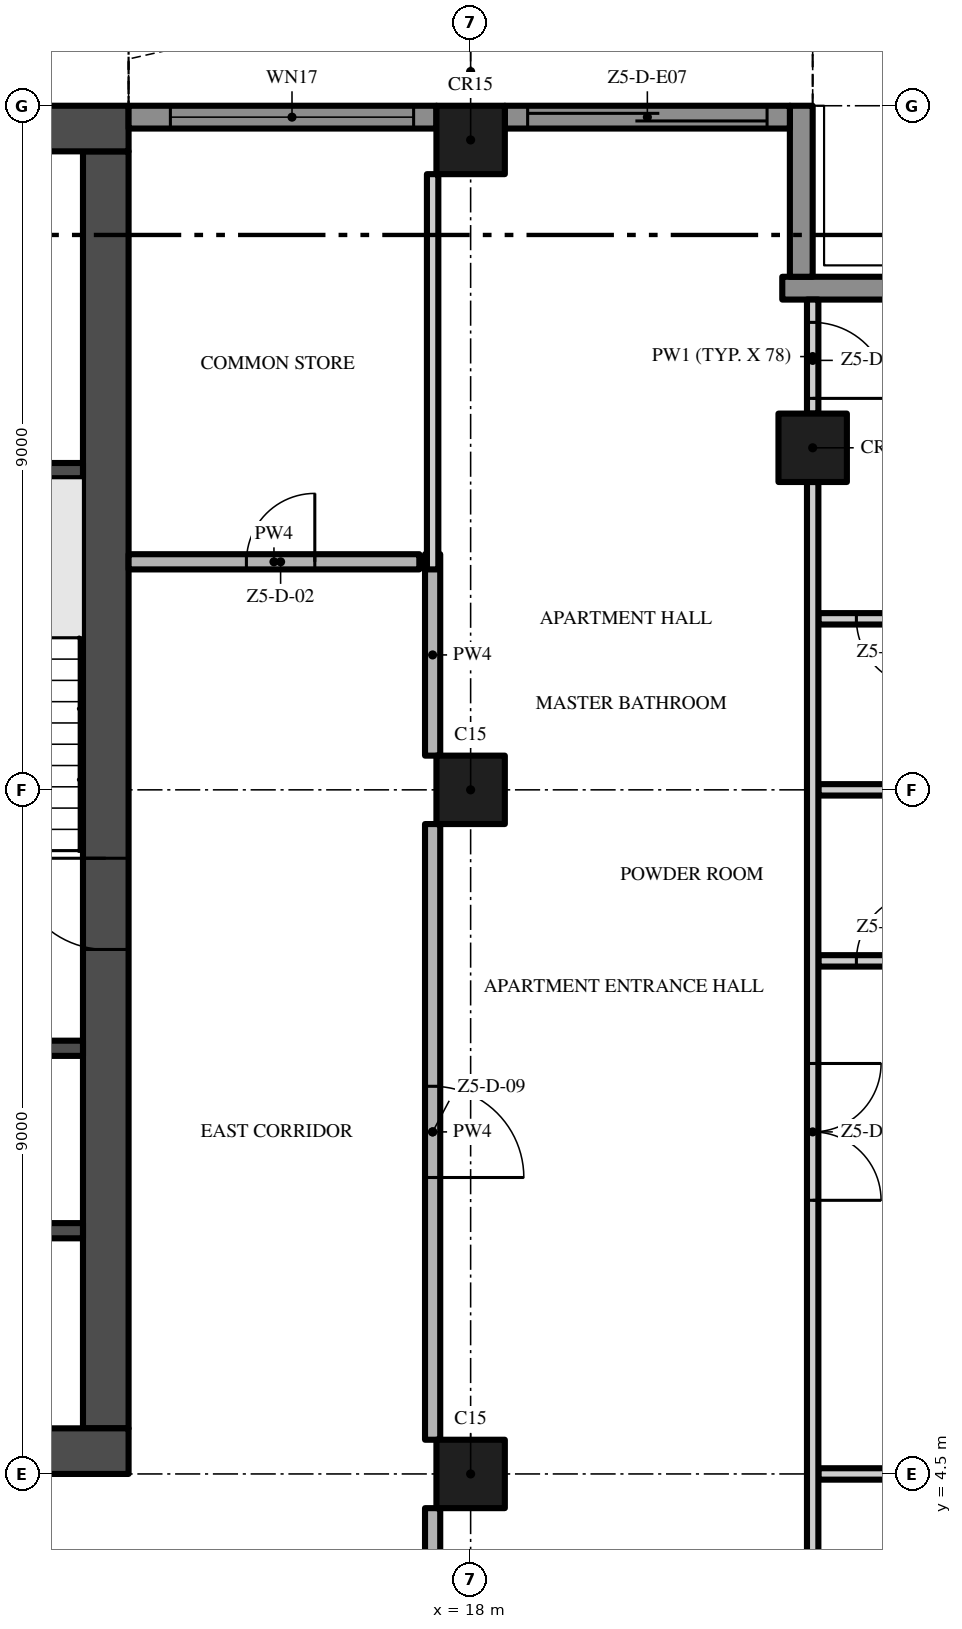
"""IFC4 building model, lengths in metres.
Left out: names, types, materials, properties, quantities, classifications, styles, units other than length and angle.
Written with IfcOpenShell. Run it as: python <this file> out.ifc"""

import sys

from ifc_helpers import new_model, si_unit, direction, frame, frame_2d, origin, origin_2d, place, context, subcontext, project, spatial, polyline, rectangle, outline, extrude, element, fill, save


model = new_model("IFC4")
c1 = context("Model", 3, precision=1e-05, world=origin(), true_north=direction((0.0, 1.0)))
c2 = subcontext(c1, "Body", "Model", "MODEL_VIEW")
j1 = project(units=[si_unit("LENGTHUNIT", "METRE"), si_unit("PLANEANGLEUNIT", "RADIAN")], contexts=[c1])
p1 = place(None, origin())
s1 = spatial("IfcSite", under=j1, at=p1, CompositionType="ELEMENT")
p2 = place(p1, origin())
s2 = spatial("IfcBuilding", under=s1, at=p2, CompositionType="ELEMENT")
p3 = place(p2, frame((0.0, 0.0, 276.8)))
s3 = spatial("IfcBuildingStorey", under=s2, at=p3, CompositionType="ELEMENT", Elevation=276.8)
p4 = place(p3, frame((-13.5, 4.8, -0.3), z_axis=(0.0, 0.0, 1.0), x_axis=(1.0, 0.0, 0.0)))
e1 = element("IfcWall", 1, at=p4, inside=s3, PredefinedType="SHEAR", context=c2, shape_type="SweptSolid", body=[
    extrude(rectangle(XDim=27.0, YDim=0.6, at=frame_2d((13.5, 0.0))), origin(), (0.0, 0.0, 1.0), 3.8),
])
p5 = place(p4, frame((12.0, 0.0, 0.3)))
e2 = element("IfcOpeningElement", 2, at=p5, cuts=e1, PredefinedType="OPENING", context=c2, shape_type="SweptSolid", body=[
    extrude(rectangle(XDim=3.0, YDim=2.4, at=frame_2d((1.5, 1.2))), frame((0.0, 0.31, 0.0), z_axis=(0.0, -1.0, 0.0), x_axis=(1.0, 0.0, 0.0)), (0.0, 0.0, 1.0), 0.62),
])
p6 = place(p4, frame((4.9, 0.0, 0.3)))
e3 = element("IfcOpeningElement", 3, at=p6, cuts=e1, PredefinedType="OPENING", context=c2, shape_type="SweptSolid", body=[
    extrude(rectangle(XDim=1.2, YDim=2.2, at=frame_2d((0.6, 1.1))), frame((0.0, 0.31, 0.0), z_axis=(0.0, -1.0, 0.0), x_axis=(1.0, 0.0, 0.0)), (0.0, 0.0, 1.0), 0.62),
])
p7 = place(p4, frame((20.75, 0.0, 0.3)))
e4 = element("IfcOpeningElement", 4, at=p7, cuts=e1, PredefinedType="OPENING", context=c2, shape_type="SweptSolid", body=[
    extrude(rectangle(XDim=1.5, YDim=2.2, at=frame_2d((0.75, 1.1))), frame((0.0, 0.31, 0.0), z_axis=(0.0, -1.0, 0.0), x_axis=(1.0, 0.0, 0.0)), (0.0, 0.0, 1.0), 0.62),
])
p8 = place(p4, frame((17.4, 0.0, 0.3)))
e5 = element("IfcOpeningElement", 5, at=p8, cuts=e1, PredefinedType="OPENING", context=c2, shape_type="SweptSolid", body=[
    extrude(rectangle(XDim=1.2, YDim=2.2, at=frame_2d((0.6, 1.1))), frame((0.0, 0.31, 0.0), z_axis=(0.0, -1.0, 0.0), x_axis=(1.0, 0.0, 0.0)), (0.0, 0.0, 1.0), 0.62),
])
p9 = place(p3, frame((13.2, 5.1, -0.3), z_axis=(0.0, 0.0, 1.0), x_axis=(0.0, 1.0, 0.0)))
e6 = element("IfcWall", 6, at=p9, inside=s3, PredefinedType="SHEAR", context=c2, shape_type="SweptSolid", body=[
    extrude(rectangle(XDim=16.8, YDim=0.6, at=frame_2d((8.4, 0.0))), origin(), (0.0, 0.0, 1.0), 3.8),
])
p10 = place(p9, frame((6.3, 0.0, 0.3)))
e7 = element("IfcOpeningElement", 7, at=p10, cuts=e6, PredefinedType="OPENING", context=c2, shape_type="SweptSolid", body=[
    extrude(rectangle(XDim=1.2, YDim=2.2, at=frame_2d((0.6, 1.1))), frame((0.0, 0.31, 0.0), z_axis=(0.0, -1.0, 0.0), x_axis=(1.0, 0.0, 0.0)), (0.0, 0.0, 1.0), 0.62),
])
p11 = place(p3, frame((13.5, 22.2, -0.3), z_axis=(0.0, 0.0, 1.0), x_axis=(-1.0, 0.0, 0.0)))
e8 = element("IfcWall", 8, at=p11, inside=s3, PredefinedType="SHEAR", context=c2, shape_type="SweptSolid", body=[
    extrude(rectangle(XDim=27.0, YDim=0.6, at=frame_2d((13.5, 0.0))), origin(), (0.0, 0.0, 1.0), 3.8),
])
for number, where, z_axis, x_axis in (
    (9, (18.0, 13.5, 0.0), (0.0, 0.0, 1.0), (1.0, 0.0, 0.0)),
    (10, (18.0, 22.05, 0.0), (0.0, 0.0, 1.0), (1.0, 0.0, 0.0)),
    (11, (18.0, 4.5, 0.0), (0.0, 0.0, 1.0), (1.0, 0.0, 0.0)),
    (12, (22.5, 18.0, 0.0), (0.0, 0.0, 1.0), (1.0, 0.0, 0.0)),
):
    element("IfcColumn", number, at=place(p3, frame(where, z_axis=z_axis, x_axis=x_axis)), inside=s3, PredefinedType="COLUMN", context=c2, shape_type="SweptSolid", body=[
        extrude(rectangle(XDim=0.9, YDim=0.9, at=origin_2d()), origin(), (0.0, 0.0, 1.0), 3.5),
    ])
p12 = place(p3, frame((22.1, 20.1, 0.0), z_axis=(0.0, 0.0, 1.0), x_axis=(1.0, 0.0, 0.0)))
e13 = element("IfcWall", 13, at=p12, inside=s3, PredefinedType="SOLIDWALL", context=c2, shape_type="SweptSolid", body=[
    extrude(rectangle(XDim=2.35, YDim=0.3, at=frame_2d((1.175, 0.0))), origin(), (0.0, 0.0, 1.0), 3.5),
])
p13 = place(p3, frame((22.35, 22.5, 0.0), z_axis=(0.0, 0.0, 1.0), x_axis=(0.0, -1.0, 0.0)))
e14 = element("IfcWall", 14, at=p13, inside=s3, PredefinedType="SOLIDWALL", context=c2, shape_type="SweptSolid", body=[
    extrude(rectangle(XDim=2.25, YDim=0.3, at=frame_2d((1.125, 0.0))), origin(), (0.0, 0.0, 1.0), 3.5),
])
p14 = place(p3, frame((18.45, 22.35, 0.0), z_axis=(0.0, 0.0, 1.0), x_axis=(1.0, 0.0, 0.0)))
e15 = element("IfcWall", 15, at=p14, inside=s3, PredefinedType="SOLIDWALL", context=c2, shape_type="SweptSolid", body=[
    extrude(rectangle(XDim=3.75, YDim=0.3, at=frame_2d((1.875, 0.0))), origin(), (0.0, 0.0, 1.0), 3.5),
])
p15 = place(p14, frame((0.3, 0.0, 0.0)))
e16 = element("IfcOpeningElement", 16, at=p15, cuts=e15, PredefinedType="OPENING", context=c2, shape_type="SweptSolid", body=[
    extrude(rectangle(XDim=3.15, YDim=2.4, at=frame_2d((1.575, 1.2))), frame((0.0, 0.16, 0.0), z_axis=(0.0, -1.0, 0.0), x_axis=(1.0, 0.0, 0.0)), (0.0, 0.0, 1.0), 0.32),
])
p16 = place(p3, frame((13.5, 22.35, 0.0), z_axis=(0.0, 0.0, 1.0), x_axis=(1.0, 0.0, 0.0)))
e17 = element("IfcWall", 17, at=p16, inside=s3, PredefinedType="SOLIDWALL", context=c2, shape_type="SweptSolid", body=[
    extrude(rectangle(XDim=4.05, YDim=0.3, at=frame_2d((2.025, 0.0))), origin(), (0.0, 0.0, 1.0), 3.5),
])
p17 = place(p16, frame((0.55, 0.0, 0.45)))
e18 = element("IfcOpeningElement", 18, at=p17, cuts=e17, PredefinedType="OPENING", context=c2, shape_type="SweptSolid", body=[
    extrude(rectangle(XDim=3.2, YDim=2.65, at=frame_2d((1.6, 1.325))), frame((0.0, 0.16, 0.0), z_axis=(0.0, -1.0, 0.0), x_axis=(1.0, 0.0, 0.0)), (0.0, 0.0, 1.0), 0.32),
])
p18 = place(p3, origin())
e19 = element("IfcWall", 19, at=p18, inside=s3, PredefinedType="USERDEFINED", context=c2, shape_type="SweptSolid", body=[
    extrude(outline(polyline([(22.5, 25.149), (21.0, 25.485), (20.625, 25.5), (19.5, 25.369), (18.0, 24.845), (16.5, 24.112), (15.0, 23.451), (13.5, 23.115), (13.555, 22.871), (15.079, 23.213), (16.605, 23.885), (18.096, 24.614), (19.556, 25.124), (20.635, 25.249), (20.967, 25.236), (22.445, 24.905), (22.5, 25.149)])), origin(), (0.0, 0.0, 1.0), 0.9),
])
for number, where, z_axis, x_axis in (
    (20, (9.65, 7.7, 0.0), (0.0, 0.0, 1.0), (1.0, 0.0, 0.0)),
    (21, (9.65, 10.1, 0.0), (0.0, 0.0, 1.0), (1.0, 0.0, 0.0)),
    (22, (9.65, 17.7, 0.0), (0.0, 0.0, 1.0), (1.0, 0.0, 0.0)),
):
    element("IfcWall", number, at=place(p3, frame(where, z_axis=z_axis, x_axis=x_axis)), inside=s3, PredefinedType="SHEAR", context=c2, shape_type="SweptSolid", body=[
        extrude(rectangle(XDim=3.25, YDim=0.2, at=frame_2d((1.625, 0.0))), origin(), (0.0, 0.0, 1.0), 3.5),
    ])
p19 = place(p3, frame((22.575, 4.5, 0.0), z_axis=(0.0, 0.0, 1.0), x_axis=(1.0, 0.0, 0.0)))
e23 = element("IfcWall", 23, at=p19, inside=s3, PredefinedType="PARTITIONING", context=c2, shape_type="SweptSolid", body=[
    extrude(rectangle(XDim=3.525, YDim=0.15, at=frame_2d((1.762, 0.0))), origin(), (0.0, 0.0, 1.0), 3.5),
])
p20 = place(p3, frame((22.575, 11.25, 0.0), z_axis=(0.0, 0.0, 1.0), x_axis=(1.0, 0.0, 0.0)))
e24 = element("IfcWall", 24, at=p20, inside=s3, PredefinedType="PARTITIONING", context=c2, shape_type="SweptSolid", body=[
    extrude(rectangle(XDim=1.875, YDim=0.15, at=frame_2d((0.938, 0.0))), origin(), (0.0, 0.0, 1.0), 3.5),
])
p21 = place(p20, frame((0.5, 0.0, 0.0)))
e25 = element("IfcOpeningElement", 25, at=p21, cuts=e24, PredefinedType="OPENING", context=c2, shape_type="SweptSolid", body=[
    extrude(rectangle(XDim=0.9, YDim=2.1, at=frame_2d((0.45, 1.05))), frame((0.0, 0.085, 0.0), z_axis=(0.0, -1.0, 0.0), x_axis=(1.0, 0.0, 0.0)), (0.0, 0.0, 1.0), 0.17),
])
p22 = place(p3, frame((22.575, 13.5, 0.0), z_axis=(0.0, 0.0, 1.0), x_axis=(1.0, 0.0, 0.0)))
e26 = element("IfcWall", 26, at=p22, inside=s3, PredefinedType="PARTITIONING", context=c2, shape_type="SweptSolid", body=[
    extrude(rectangle(XDim=1.875, YDim=0.15, at=frame_2d((0.938, 0.0))), origin(), (0.0, 0.0, 1.0), 3.5),
])
p23 = place(p3, frame((24.45, 15.75, 0.0), z_axis=(0.0, 0.0, 1.0), x_axis=(-1.0, 0.0, 0.0)))
e27 = element("IfcWall", 27, at=p23, inside=s3, PredefinedType="PARTITIONING", context=c2, shape_type="SweptSolid", body=[
    extrude(rectangle(XDim=1.875, YDim=0.15, at=frame_2d((0.938, 0.0))), origin(), (0.0, 0.0, 1.0), 3.5),
])
p24 = place(p23, frame((0.475, 0.0, 0.0)))
e28 = element("IfcOpeningElement", 28, at=p24, cuts=e27, PredefinedType="OPENING", context=c2, shape_type="SweptSolid", body=[
    extrude(rectangle(XDim=0.9, YDim=2.1, at=frame_2d((0.45, 1.05))), frame((0.0, 0.085, 0.0), z_axis=(0.0, -1.0, 0.0), x_axis=(1.0, 0.0, 0.0)), (0.0, 0.0, 1.0), 0.17),
])
p25 = place(p3, frame((13.5, 16.5, 0.0), z_axis=(0.0, 0.0, 1.0), x_axis=(1.0, 0.0, 0.0)))
e29 = element("IfcWall", 29, at=p25, inside=s3, PredefinedType="PARTITIONING", context=c2, shape_type="SweptSolid", body=[
    extrude(rectangle(XDim=3.825, YDim=0.2, at=frame_2d((1.913, 0.0))), origin(), (0.0, 0.0, 1.0), 3.5),
])
p26 = place(p25, frame((1.55, 0.0, 0.0)))
e30 = element("IfcOpeningElement", 30, at=p26, cuts=e29, PredefinedType="OPENING", context=c2, shape_type="SweptSolid", body=[
    extrude(rectangle(XDim=0.9, YDim=2.1, at=frame_2d((0.45, 1.05))), frame((0.0, 0.11, 0.0), z_axis=(0.0, -1.0, 0.0), x_axis=(1.0, 0.0, 0.0)), (0.0, 0.0, 1.0), 0.22),
])
p27 = place(p3, frame((17.5, -0.2, 0.0), z_axis=(0.0, 0.0, 1.0), x_axis=(0.0, 1.0, 0.0)))
e31 = element("IfcWall", 31, at=p27, inside=s3, PredefinedType="PARTITIONING", context=c2, shape_type="SweptSolid", body=[
    extrude(rectangle(XDim=4.25, YDim=0.2, at=frame_2d((2.125, 0.0))), origin(), (0.0, 0.0, 1.0), 3.5),
])
p28 = place(p3, frame((17.5, 13.05, 0.0), z_axis=(0.0, 0.0, 1.0), x_axis=(0.0, -1.0, 0.0)))
e32 = element("IfcWall", 32, at=p28, inside=s3, PredefinedType="PARTITIONING", context=c2, shape_type="SweptSolid", body=[
    extrude(rectangle(XDim=8.1, YDim=0.2, at=frame_2d((4.05, 0.0))), origin(), (0.0, 0.0, 1.0), 3.5),
])
p29 = place(p28, frame((3.45, 0.0, 0.0)))
e33 = element("IfcOpeningElement", 33, at=p29, cuts=e32, PredefinedType="OPENING", context=c2, shape_type="SweptSolid", body=[
    extrude(rectangle(XDim=1.2, YDim=2.4, at=frame_2d((0.6, 1.2))), frame((0.0, 0.11, 0.0), z_axis=(0.0, -1.0, 0.0), x_axis=(1.0, 0.0, 0.0)), (0.0, 0.0, 1.0), 0.22),
])
p30 = place(p3, frame((17.5, 13.95, 0.0), z_axis=(0.0, 0.0, 1.0), x_axis=(0.0, 1.0, 0.0)))
e34 = element("IfcWall", 34, at=p30, inside=s3, PredefinedType="PARTITIONING", context=c2, shape_type="SweptSolid", body=[
    extrude(rectangle(XDim=2.65, YDim=0.2, at=frame_2d((1.325, 0.0))), origin(), (0.0, 0.0, 1.0), 3.5),
])
p31 = place(p3, frame((17.5, 16.4, 0.0), z_axis=(0.0, 0.0, 1.0), x_axis=(0.0, 1.0, 0.0)))
e35 = element("IfcWall", 35, at=p31, inside=s3, PredefinedType="PARTITIONING", context=c2, shape_type="SweptSolid", body=[
    extrude(rectangle(XDim=5.2, YDim=0.15, at=frame_2d((2.6, 0.0))), origin(), (0.0, 0.0, 1.0), 3.5),
])
p32 = place(p3, frame((22.5, 17.55, 0.0), z_axis=(0.0, 0.0, 1.0), x_axis=(0.0, -1.0, 0.0)))
e36 = element("IfcWall", 36, at=p32, inside=s3, PredefinedType="PARTITIONING", context=c2, shape_type="SweptSolid", body=[
    extrude(rectangle(XDim=17.45, YDim=0.15, at=frame_2d((8.725, 0.0))), origin(), (0.0, 0.0, 1.0), 3.5),
])
p33 = place(p32, frame((14.8, 0.0, 0.0)))
e37 = element("IfcOpeningElement", 37, at=p33, cuts=e36, PredefinedType="OPENING", context=c2, shape_type="SweptSolid", body=[
    extrude(rectangle(XDim=1.0, YDim=2.4, at=frame_2d((0.5, 1.2))), frame((0.0, 0.085, 0.0), z_axis=(0.0, -1.0, 0.0), x_axis=(1.0, 0.0, 0.0)), (0.0, 0.0, 1.0), 0.17),
])
p34 = place(p32, frame((7.65, 0.0, 0.0)))
e38 = element("IfcOpeningElement", 38, at=p34, cuts=e36, PredefinedType="OPENING", context=c2, shape_type="SweptSolid", body=[
    extrude(rectangle(XDim=1.8, YDim=2.4, at=frame_2d((0.9, 1.2))), frame((0.0, 0.085, 0.0), z_axis=(0.0, -1.0, 0.0), x_axis=(1.0, 0.0, 0.0)), (0.0, 0.0, 1.0), 0.17),
])
p35 = place(p3, frame((22.5, 19.95, 0.0), z_axis=(0.0, 0.0, 1.0), x_axis=(0.0, -1.0, 0.0)))
e39 = element("IfcWall", 39, at=p35, inside=s3, PredefinedType="PARTITIONING", context=c2, shape_type="SweptSolid", body=[
    extrude(rectangle(XDim=1.5, YDim=0.15, at=frame_2d((0.75, 0.0))), origin(), (0.0, 0.0, 1.0), 3.5),
])
p36 = place(p35, frame((0.3, 0.0, 0.0)))
e40 = element("IfcOpeningElement", 40, at=p36, cuts=e39, PredefinedType="OPENING", context=c2, shape_type="SweptSolid", body=[
    extrude(rectangle(XDim=1.0, YDim=2.4, at=frame_2d((0.5, 1.2))), frame((0.0, 0.085, 0.0), z_axis=(0.0, -1.0, 0.0), x_axis=(1.0, 0.0, 0.0)), (0.0, 0.0, 1.0), 0.17),
])
p37 = place(p15, origin())
e41 = element("IfcDoor", 41, at=p37, inside=s3, OperationType="SINGLE_SWING_LEFT", PredefinedType="DOOR", context=c2, shape_type="SweptSolid", body=[
    extrude(rectangle(XDim=3.15, YDim=2.4, at=frame_2d((1.575, 1.2))), frame((0.0, 0.025, 0.0), z_axis=(0.0, -1.0, 0.0), x_axis=(1.0, 0.0, 0.0)), (0.0, 0.0, 1.0), 0.05),
])
fill(e16, e41)
p38 = place(p17, origin())
e42 = element("IfcWindow", 42, at=p38, inside=s3, PartitioningType="SINGLE_PANEL", PredefinedType="WINDOW", context=c2, shape_type="SweptSolid", body=[
    extrude(rectangle(XDim=3.2, YDim=2.65, at=frame_2d((1.6, 1.325))), frame((0.0, 0.03, 0.0), z_axis=(0.0, -1.0, 0.0), x_axis=(1.0, 0.0, 0.0)), (0.0, 0.0, 1.0), 0.06),
])
fill(e18, e42)
p39 = place(p10, frame((1.2, 0.0, 0.0), z_axis=(0.0, 0.0, 1.0), x_axis=(-1.0, 0.0, 0.0)))
e43 = element("IfcDoor", 43, at=p39, inside=s3, OperationType="SINGLE_SWING_LEFT", PredefinedType="DOOR", context=c2, shape_type="SweptSolid", body=[
    extrude(rectangle(XDim=1.2, YDim=2.2, at=frame_2d((0.6, 1.1))), frame((0.0, 0.025, 0.0), z_axis=(0.0, -1.0, 0.0), x_axis=(1.0, 0.0, 0.0)), (0.0, 0.0, 1.0), 0.05),
])
fill(e7, e43)
p40 = place(p26, origin())
e44 = element("IfcDoor", 44, at=p40, inside=s3, OperationType="SINGLE_SWING_RIGHT", PredefinedType="DOOR", context=c2, shape_type="SweptSolid", body=[
    extrude(rectangle(XDim=0.9, YDim=2.1, at=frame_2d((0.45, 1.05))), frame((0.0, 0.025, 0.0), z_axis=(0.0, -1.0, 0.0), x_axis=(1.0, 0.0, 0.0)), (0.0, 0.0, 1.0), 0.05),
])
fill(e30, e44)
p41 = place(p29, origin())
e45 = element("IfcDoor", 45, at=p41, inside=s3, OperationType="SINGLE_SWING_RIGHT", PredefinedType="DOOR", context=c2, shape_type="SweptSolid", body=[
    extrude(rectangle(XDim=1.2, YDim=2.4, at=frame_2d((0.6, 1.2))), frame((0.0, 0.025, 0.0), z_axis=(0.0, -1.0, 0.0), x_axis=(1.0, 0.0, 0.0)), (0.0, 0.0, 1.0), 0.05),
])
fill(e33, e45)
p42 = place(p34, origin())
e46 = element("IfcDoor", 46, at=p42, inside=s3, OperationType="DOUBLE_DOOR_SINGLE_SWING", PredefinedType="DOOR", context=c2, shape_type="SweptSolid", body=[
    extrude(rectangle(XDim=1.8, YDim=2.4, at=frame_2d((0.9, 1.2))), frame((0.0, 0.025, 0.0), z_axis=(0.0, -1.0, 0.0), x_axis=(1.0, 0.0, 0.0)), (0.0, 0.0, 1.0), 0.05),
])
fill(e38, e46)
p43 = place(p21, origin())
e47 = element("IfcDoor", 47, at=p43, inside=s3, OperationType="SINGLE_SWING_RIGHT", PredefinedType="DOOR", context=c2, shape_type="SweptSolid", body=[
    extrude(rectangle(XDim=0.9, YDim=2.1, at=frame_2d((0.45, 1.05))), frame((0.0, 0.025, 0.0), z_axis=(0.0, -1.0, 0.0), x_axis=(1.0, 0.0, 0.0)), (0.0, 0.0, 1.0), 0.05),
])
fill(e25, e47)
p44 = place(p36, origin())
e48 = element("IfcDoor", 48, at=p44, inside=s3, OperationType="SINGLE_SWING_RIGHT", PredefinedType="DOOR", context=c2, shape_type="SweptSolid", body=[
    extrude(rectangle(XDim=1.0, YDim=2.4, at=frame_2d((0.5, 1.2))), frame((0.0, 0.025, 0.0), z_axis=(0.0, -1.0, 0.0), x_axis=(1.0, 0.0, 0.0)), (0.0, 0.0, 1.0), 0.05),
])
fill(e40, e48)
p45 = place(p24, origin())
e49 = element("IfcDoor", 49, at=p45, inside=s3, OperationType="SINGLE_SWING_LEFT", PredefinedType="DOOR", context=c2, shape_type="SweptSolid", body=[
    extrude(rectangle(XDim=0.9, YDim=2.1, at=frame_2d((0.45, 1.05))), frame((0.0, 0.025, 0.0), z_axis=(0.0, -1.0, 0.0), x_axis=(1.0, 0.0, 0.0)), (0.0, 0.0, 1.0), 0.05),
])
fill(e28, e49)
save(model, sys.argv[1])
